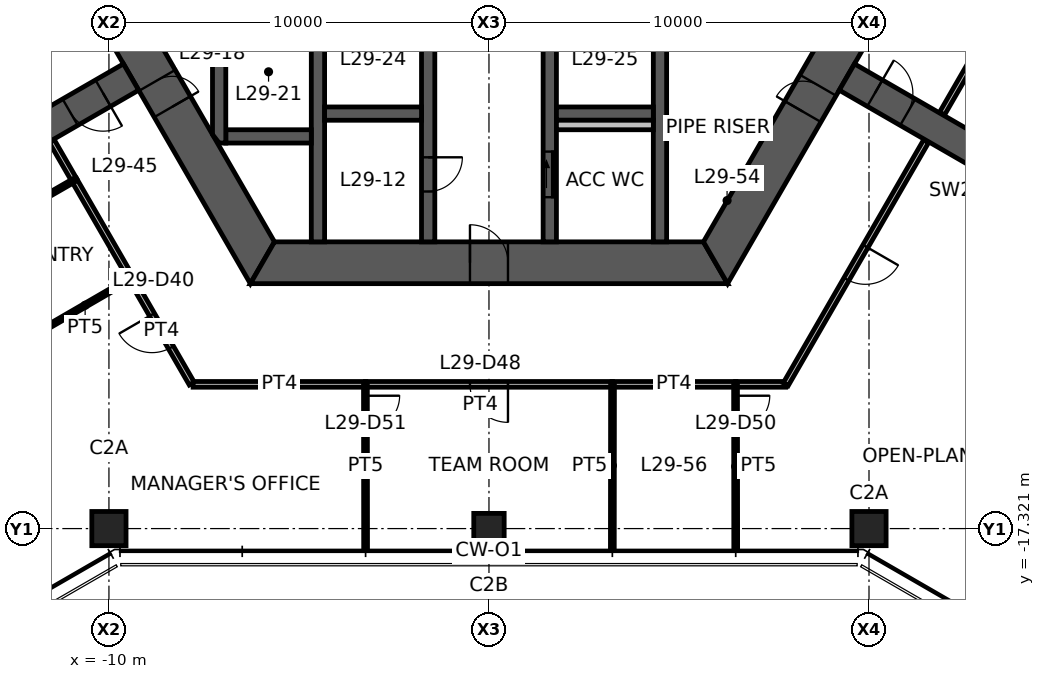
"""IFC4 building model, lengths in metres.
Left out: names, types, materials, properties, quantities, classifications, styles, units other than length and angle.
Written with IfcOpenShell. Run it as: python <this file> out.ifc"""

import sys

from ifc_helpers import new_model, si_unit, direction, frame, frame_2d, origin, origin_2d, place, context, subcontext, project, spatial, polyline, rectangle, hollow_rectangle, outline, extrude, element, fill, save


model = new_model("IFC4")
c1 = context("Model", 3, precision=1e-05, world=origin(), true_north=direction((0.0, 1.0)))
c2 = subcontext(c1, "Body", "Model", "MODEL_VIEW")
j1 = project(units=[si_unit("LENGTHUNIT", "METRE"), si_unit("PLANEANGLEUNIT", "RADIAN")], contexts=[c1])
p1 = place(None, origin())
s1 = spatial("IfcSite", under=j1, at=p1, CompositionType="ELEMENT")
p2 = place(p1, origin())
s2 = spatial("IfcBuilding", under=s1, at=p2, CompositionType="ELEMENT")
p3 = place(p2, frame((0.0, 0.0, 115.8)))
s3 = spatial("IfcBuildingStorey", under=s2, at=p3, CompositionType="ELEMENT", Elevation=115.8)
for number, where, z_axis, x_axis in (
    (1, (-10.0, -17.321, 0.0), (0.0, 0.0, 1.0), (1.0, 0.0, 0.0)),
    (2, (10.0, -17.321, 0.0), (0.0, 0.0, 1.0), (1.0, 0.0, 0.0)),
):
    element("IfcColumn", number, at=place(p3, frame(where, z_axis=z_axis, x_axis=x_axis)), inside=s3, PredefinedType="COLUMN", context=c2, shape_type="SweptSolid", body=[
        extrude(hollow_rectangle(XDim=0.9, YDim=0.9, WallThickness=0.055, at=origin_2d()), origin(), (0.0, 0.0, 1.0), 3.9),
    ])
p4 = place(p3, frame((0.0, -17.321, 0.0), z_axis=(0.0, 0.0, 1.0), x_axis=(1.0, 0.0, 0.0)))
e3 = element("IfcColumn", 3, at=p4, inside=s3, PredefinedType="COLUMN", context=c2, shape_type="SweptSolid", body=[
    extrude(hollow_rectangle(XDim=0.8, YDim=0.8, WallThickness=0.045, at=origin_2d()), origin(), (0.0, 0.0, 1.0), 3.9),
])
p5 = place(p3, frame((-11.922, 0.0, 0.0), z_axis=(0.0, 0.0, 1.0), x_axis=(0.500004296715, -0.866022923061, 0.0)))
e4 = element("IfcWall", 4, at=p5, inside=s3, PredefinedType="SHEAR", context=c2, shape_type="SweptSolid", body=[
    extrude(outline(polyline([(-0.318, -0.55), (6.381, -0.55), (7.181, -0.55), (12.24, -0.55), (11.605, 0.55), (7.181, 0.55), (6.381, 0.55), (0.318, 0.55), (-0.318, -0.55)])), origin(), (0.0, 0.0, 1.0), 3.9),
])
p6 = place(p5, frame((6.381, 0.0, 0.0)))
e5 = element("IfcOpeningElement", 5, at=p6, cuts=e4, PredefinedType="OPENING", context=c2, shape_type="SweptSolid", body=[
    extrude(rectangle(XDim=0.8, YDim=2.1, at=frame_2d((0.4, 1.05))), frame((0.0, 0.56, 0.0), z_axis=(0.0, -1.0, 0.0), x_axis=(1.0, 0.0, 0.0)), (0.0, 0.0, 1.0), 1.12),
])
p7 = place(p3, frame((-5.961, -10.325, 0.0), z_axis=(0.0, 0.0, 1.0), x_axis=(1.0, 0.0, 0.0)))
e6 = element("IfcWall", 6, at=p7, inside=s3, PredefinedType="SHEAR", context=c2, shape_type="SweptSolid", body=[
    extrude(outline(polyline([(-0.318, -0.55), (5.461, -0.55), (6.461, -0.55), (12.24, -0.55), (11.605, 0.55), (6.461, 0.55), (5.461, 0.55), (0.318, 0.55), (-0.318, -0.55)])), origin(), (0.0, 0.0, 1.0), 3.9),
])
p8 = place(p7, frame((5.461, 0.0, 0.0)))
e7 = element("IfcOpeningElement", 7, at=p8, cuts=e6, PredefinedType="OPENING", context=c2, shape_type="SweptSolid", body=[
    extrude(rectangle(XDim=1.0, YDim=2.1, at=frame_2d((0.5, 1.05))), frame((0.0, 0.56, 0.0), z_axis=(0.0, -1.0, 0.0), x_axis=(1.0, 0.0, 0.0)), (0.0, 0.0, 1.0), 1.12),
])
p9 = place(p3, frame((5.961, -10.325, 0.0), z_axis=(0.0, 0.0, 1.0), x_axis=(0.500004296715, 0.866022923061, 0.0)))
e8 = element("IfcWall", 8, at=p9, inside=s3, PredefinedType="SHEAR", context=c2, shape_type="SweptSolid", body=[
    extrude(outline(polyline([(-0.318, -0.55), (4.594, -0.55), (5.394, -0.55), (12.24, -0.55), (11.605, 0.55), (5.394, 0.55), (4.594, 0.55), (0.318, 0.55), (-0.318, -0.55)])), origin(), (0.0, 0.0, 1.0), 3.9),
])
p10 = place(p9, frame((4.594, 0.0, 0.0)))
e9 = element("IfcOpeningElement", 9, at=p10, cuts=e8, PredefinedType="OPENING", context=c2, shape_type="SweptSolid", body=[
    extrude(rectangle(XDim=0.8, YDim=2.1, at=frame_2d((0.4, 1.05))), frame((0.0, 0.56, 0.0), z_axis=(0.0, -1.0, 0.0), x_axis=(1.0, 0.0, 0.0)), (0.0, 0.0, 1.0), 1.12),
])
p11 = place(p3, frame((-9.418, -5.438, 0.0), z_axis=(0.0, 0.0, 1.0), x_axis=(-0.866029782078, -0.499992416496, 0.0)))
e10 = element("IfcWall", 10, at=p11, inside=s3, PredefinedType="SHEAR", context=c2, shape_type="SweptSolid", body=[
    extrude(rectangle(XDim=7.646, YDim=0.8, at=frame_2d((3.823, 0.0))), origin(), (0.0, 0.0, 1.0), 3.9),
])
p12 = place(p11, frame((0.85, 0.0, 0.0)))
e11 = element("IfcOpeningElement", 11, at=p12, cuts=e10, PredefinedType="OPENING", context=c2, shape_type="SweptSolid", body=[
    extrude(rectangle(XDim=1.0, YDim=2.1, at=frame_2d((0.5, 1.05))), frame((0.0, 0.41, 0.0), z_axis=(0.0, -1.0, 0.0), x_axis=(1.0, 0.0, 0.0)), (0.0, 0.0, 1.0), 0.82),
])
p13 = place(p3, frame((9.418, -5.438, 0.0), z_axis=(0.0, 0.0, 1.0), x_axis=(0.866029782078, -0.499992416496, 0.0)))
e12 = element("IfcWall", 12, at=p13, inside=s3, PredefinedType="SHEAR", context=c2, shape_type="SweptSolid", body=[
    extrude(rectangle(XDim=7.646, YDim=0.8, at=frame_2d((3.823, 0.0))), origin(), (0.0, 0.0, 1.0), 3.9),
])
p14 = place(p13, frame((0.85, 0.0, 0.0)))
e13 = element("IfcOpeningElement", 13, at=p14, cuts=e12, PredefinedType="OPENING", context=c2, shape_type="SweptSolid", body=[
    extrude(rectangle(XDim=1.0, YDim=2.1, at=frame_2d((0.5, 1.05))), frame((0.0, 0.41, 0.0), z_axis=(0.0, -1.0, 0.0), x_axis=(1.0, 0.0, 0.0)), (0.0, 0.0, 1.0), 0.82),
])
p15 = place(p3, frame((-1.6, -3.775, 0.0), z_axis=(0.0, 0.0, 1.0), x_axis=(0.0, -1.0, 0.0)))
e14 = element("IfcWall", 14, at=p15, inside=s3, PredefinedType="SHEAR", context=c2, shape_type="SweptSolid", body=[
    extrude(rectangle(XDim=6.0, YDim=0.35, at=frame_2d((3.0, 0.0))), origin(), (0.0, 0.0, 1.0), 3.9),
])
p16 = place(p15, frame((3.775, 0.0, 0.0)))
e15 = element("IfcOpeningElement", 15, at=p16, cuts=e14, PredefinedType="OPENING", context=c2, shape_type="SweptSolid", body=[
    extrude(rectangle(XDim=0.9, YDim=2.1, at=frame_2d((0.45, 1.05))), frame((0.0, 0.185, 0.0), z_axis=(0.0, -1.0, 0.0), x_axis=(1.0, 0.0, 0.0)), (0.0, 0.0, 1.0), 0.37),
])
p17 = place(p3, frame((1.6, -3.775, 0.0), z_axis=(0.0, 0.0, 1.0), x_axis=(0.0, -1.0, 0.0)))
e16 = element("IfcWall", 16, at=p17, inside=s3, PredefinedType="SHEAR", context=c2, shape_type="SweptSolid", body=[
    extrude(rectangle(XDim=6.0, YDim=0.35, at=frame_2d((3.0, 0.0))), origin(), (0.0, 0.0, 1.0), 3.9),
])
p18 = place(p17, frame((3.625, 0.0, 0.0)))
e17 = element("IfcOpeningElement", 17, at=p18, cuts=e16, PredefinedType="OPENING", context=c2, shape_type="SweptSolid", body=[
    extrude(rectangle(XDim=1.2, YDim=2.1, at=frame_2d((0.6, 1.05))), frame((0.0, 0.185, 0.0), z_axis=(0.0, -1.0, 0.0), x_axis=(1.0, 0.0, 0.0)), (0.0, 0.0, 1.0), 0.37),
])
for number, where, z_axis, x_axis in (
    (18, (-4.5, -3.775, 0.0), (0.0, 0.0, 1.0), (0.0, -1.0, 0.0)),
    (19, (4.5, -3.775, 0.0), (0.0, 0.0, 1.0), (0.0, -1.0, 0.0)),
):
    element("IfcWall", number, at=place(p3, frame(where, z_axis=z_axis, x_axis=x_axis)), inside=s3, PredefinedType="SHEAR", context=c2, shape_type="SweptSolid", body=[
        extrude(rectangle(XDim=6.0, YDim=0.35, at=frame_2d((3.0, 0.0))), origin(), (0.0, 0.0, 1.0), 3.9),
    ])
for number, where, z_axis, x_axis in (
    (20, (-4.325, -6.4, 0.0), (0.0, 0.0, 1.0), (1.0, 0.0, 0.0)),
    (21, (1.775, -6.4, 0.0), (0.0, 0.0, 1.0), (1.0, 0.0, 0.0)),
):
    element("IfcWall", number, at=place(p3, frame(where, z_axis=z_axis, x_axis=x_axis)), inside=s3, PredefinedType="SHEAR", context=c2, shape_type="SweptSolid", body=[
        extrude(rectangle(XDim=2.55, YDim=0.35, at=frame_2d((1.275, 0.0))), origin(), (0.0, 0.0, 1.0), 3.9),
    ])
p19 = place(p3, frame((-6.925, -7.0, 0.0), z_axis=(0.0, 0.0, 1.0), x_axis=(1.0, 0.0, 0.0)))
e22 = element("IfcWall", 22, at=p19, inside=s3, PredefinedType="SHEAR", context=c2, shape_type="SweptSolid", body=[
    extrude(rectangle(XDim=2.25, YDim=0.35, at=frame_2d((1.125, 0.0))), origin(), (0.0, 0.0, 1.0), 3.9),
])
p20 = place(p3, frame((-7.1, -3.775, 0.0), z_axis=(0.0, 0.0, 1.0), x_axis=(0.0, -1.0, 0.0)))
e23 = element("IfcWall", 23, at=p20, inside=s3, PredefinedType="SHEAR", context=c2, shape_type="SweptSolid", body=[
    extrude(outline(polyline([(0.0, -0.175), (3.175, -0.175), (3.4, 0.0), (3.4, 0.175), (0.0, 0.175), (0.0, -0.175)])), origin(), (0.0, 0.0, 1.0), 3.9),
])
p21 = place(p3, frame((1.775, -6.7, 0.0), z_axis=(0.0, 0.0, 1.0), x_axis=(1.0, 0.0, 0.0)))
e24 = element("IfcWall", 24, at=p21, inside=s3, PredefinedType="PLUMBINGWALL", context=c2, shape_type="SweptSolid", body=[
    extrude(rectangle(XDim=2.55, YDim=0.25, at=frame_2d((1.275, 0.0))), origin(), (0.0, 0.0, 1.0), 3.9),
])
p22 = place(p3, frame((-9.41, -10.75, 0.0), z_axis=(0.0, 0.0, 1.0), x_axis=(-0.500038395149, 0.8660032352, 0.0)))
e25 = element("IfcWall", 25, at=p22, inside=s3, PredefinedType="PARTITIONING", context=c2, shape_type="SweptSolid", body=[
    extrude(rectangle(XDim=3.01, YDim=0.15, at=frame_2d((1.505, 0.0))), origin(), (0.0, 0.0, 1.0), 2.95),
])
p23 = place(p3, frame((-10.911, -8.152, 0.0), z_axis=(0.0, 0.0, 1.0), x_axis=(-0.499841408252, 0.866116947413, 0.0)))
e26 = element("IfcWall", 26, at=p23, inside=s3, PredefinedType="PARTITIONING", context=c2, shape_type="SweptSolid", body=[
    extrude(rectangle(XDim=1.185, YDim=0.15, at=frame_2d((0.592, 0.0))), origin(), (0.0, 0.0, 1.0), 2.95),
])
p24 = place(p3, frame((-7.82, -13.505, 0.0), z_axis=(0.0, 0.0, 1.0), x_axis=(-0.499983030129, 0.866035201123, 0.0)))
e27 = element("IfcWall", 27, at=p24, inside=s3, PredefinedType="PARTITIONING", context=c2, shape_type="SweptSolid", body=[
    extrude(rectangle(XDim=3.19, YDim=0.15, at=frame_2d((1.595, 0.0))), origin(), (0.0, 0.0, 1.0), 2.95),
])
p25 = place(p24, frame((1.095, 0.0, 0.0)))
e28 = element("IfcOpeningElement", 28, at=p25, cuts=e27, PredefinedType="OPENING", context=c2, shape_type="SweptSolid", body=[
    extrude(rectangle(XDim=1.0, YDim=2.1, at=frame_2d((0.5, 1.05))), frame((0.0, 0.085, 0.0), z_axis=(0.0, -1.0, 0.0), x_axis=(1.0, 0.0, 0.0)), (0.0, 0.0, 1.0), 0.17),
])
p26 = place(p3, frame((-13.338, -9.548, 0.0), z_axis=(0.0, 0.0, 1.0), x_axis=(0.866833758708, 0.498597267105, 0.0)))
e29 = element("IfcWall", 29, at=p26, inside=s3, PredefinedType="PARTITIONING", context=c2, shape_type="SweptSolid", body=[
    extrude(rectangle(XDim=2.8, YDim=0.1, at=frame_2d((1.4, 0.0))), origin(), (0.0, 0.0, 1.0), 2.95),
])
p27 = place(p3, frame((-9.415, -10.742, 0.0), z_axis=(0.0, 0.0, 1.0), x_axis=(-0.865195372903, -0.501434907746, 0.0)))
e30 = element("IfcWall", 30, at=p27, inside=s3, PredefinedType="PARTITIONING", context=c2, shape_type="SweptSolid", body=[
    extrude(rectangle(XDim=2.8, YDim=0.1, at=frame_2d((1.4, 0.0))), origin(), (0.0, 0.0, 1.0), 2.95),
])
p28 = place(p3, frame((15.606, -0.02, 0.0), z_axis=(0.0, 0.0, 1.0), x_axis=(-0.499989298045, -0.866031582473, 0.0)))
e31 = element("IfcWall", 31, at=p28, inside=s3, PredefinedType="PARTITIONING", context=c2, shape_type="SweptSolid", body=[
    extrude(rectangle(XDim=7.365, YDim=0.15, at=frame_2d((3.683, 0.0))), origin(), (0.0, 0.0, 1.0), 2.95),
])
p29 = place(p28, frame((3.183, 0.0, 0.0)))
e32 = element("IfcOpeningElement", 32, at=p29, cuts=e31, PredefinedType="OPENING", context=c2, shape_type="SweptSolid", body=[
    extrude(rectangle(XDim=1.0, YDim=2.1, at=frame_2d((0.5, 1.05))), frame((0.0, 0.085, 0.0), z_axis=(0.0, -1.0, 0.0), x_axis=(1.0, 0.0, 0.0)), (0.0, 0.0, 1.0), 0.17),
])
p30 = place(p3, frame((6.498, -13.525, 0.0), z_axis=(0.0, 0.0, 1.0), x_axis=(-1.0, 0.0, 0.0)))
e33 = element("IfcWall", 33, at=p30, inside=s3, PredefinedType="PARTITIONING", context=c2, shape_type="SweptSolid", body=[
    extrude(rectangle(XDim=3.256, YDim=0.15, at=frame_2d((1.628, 0.0))), origin(), (0.0, 0.0, 1.0), 2.95),
])
p31 = place(p3, frame((-3.241, -13.525, 0.0), z_axis=(0.0, 0.0, 1.0), x_axis=(-1.0, 0.0, 0.0)))
e34 = element("IfcWall", 34, at=p31, inside=s3, PredefinedType="PARTITIONING", context=c2, shape_type="SweptSolid", body=[
    extrude(rectangle(XDim=4.544, YDim=0.15, at=frame_2d((2.272, 0.0))), origin(), (0.0, 0.0, 1.0), 2.95),
])
p32 = place(p3, frame((7.809, -13.525, 0.0), z_axis=(0.0, 0.0, 1.0), x_axis=(-1.0, 0.0, 0.0)))
e35 = element("IfcWall", 35, at=p32, inside=s3, PredefinedType="PARTITIONING", context=c2, shape_type="SweptSolid", body=[
    extrude(rectangle(XDim=1.32, YDim=0.15, at=frame_2d((0.66, 0.0))), origin(), (0.0, 0.0, 1.0), 2.95),
])
p33 = place(p3, frame((11.503, -7.126, 0.0), z_axis=(0.0, 0.0, 1.0), x_axis=(-0.500005620463, -0.866022158784, 0.0)))
e36 = element("IfcWall", 36, at=p33, inside=s3, PredefinedType="PARTITIONING", context=c2, shape_type="SweptSolid", body=[
    extrude(rectangle(XDim=7.389, YDim=0.15, at=frame_2d((3.694, 0.0))), origin(), (0.0, 0.0, 1.0), 2.95),
])
p34 = place(p33, frame((3.194, 0.0, 0.0)))
e37 = element("IfcOpeningElement", 37, at=p34, cuts=e36, PredefinedType="OPENING", context=c2, shape_type="SweptSolid", body=[
    extrude(rectangle(XDim=1.0, YDim=2.1, at=frame_2d((0.5, 1.05))), frame((0.0, 0.085, 0.0), z_axis=(0.0, -1.0, 0.0), x_axis=(1.0, 0.0, 0.0)), (0.0, 0.0, 1.0), 0.17),
])
p35 = place(p3, frame((3.251, -13.525, 0.0), z_axis=(0.0, 0.0, 1.0), x_axis=(-1.0, 0.0, 0.0)))
e38 = element("IfcWall", 38, at=p35, inside=s3, PredefinedType="PARTITIONING", context=c2, shape_type="SweptSolid", body=[
    extrude(rectangle(XDim=6.502, YDim=0.15, at=frame_2d((3.251, 0.0))), origin(), (0.0, 0.0, 1.0), 2.95),
])
p36 = place(p35, frame((2.751, 0.0, 0.0)))
e39 = element("IfcOpeningElement", 39, at=p36, cuts=e38, PredefinedType="OPENING", context=c2, shape_type="SweptSolid", body=[
    extrude(rectangle(XDim=1.0, YDim=2.1, at=frame_2d((0.5, 1.05))), frame((0.0, 0.085, 0.0), z_axis=(0.0, -1.0, 0.0), x_axis=(1.0, 0.0, 0.0)), (0.0, 0.0, 1.0), 0.17),
])
p37 = place(p3, frame((6.488, -13.525, 0.0), z_axis=(0.0, 0.0, 1.0), x_axis=(0.00107362768, -0.999999423662, 0.0)))
e40 = element("IfcWall", 40, at=p37, inside=s3, PredefinedType="PARTITIONING", context=c2, shape_type="SweptSolid", body=[
    extrude(rectangle(XDim=4.321, YDim=0.1, at=frame_2d((2.16, 0.0))), origin(), (0.0, 0.0, 1.0), 2.95),
])
p38 = place(p37, frame((0.3, 0.0, 0.0)))
e41 = element("IfcOpeningElement", 41, at=p38, cuts=e40, PredefinedType="OPENING", context=c2, shape_type="SweptSolid", body=[
    extrude(rectangle(XDim=0.9, YDim=2.1, at=frame_2d((0.45, 1.05))), frame((0.0, 0.06, 0.0), z_axis=(0.0, -1.0, 0.0), x_axis=(1.0, 0.0, 0.0)), (0.0, 0.0, 1.0), 0.12),
])
p39 = place(p3, frame((3.246, -17.801, 0.0), z_axis=(0.0, 0.0, 1.0), x_axis=(0.001084907715, 0.999999411487, 0.0)))
e42 = element("IfcWall", 42, at=p39, inside=s3, PredefinedType="PARTITIONING", context=c2, shape_type="SweptSolid", body=[
    extrude(rectangle(XDim=4.276, YDim=0.1, at=frame_2d((2.138, 0.0))), origin(), (0.0, 0.0, 1.0), 2.95),
])
p40 = place(p3, frame((-3.251, -13.525, 0.0), z_axis=(0.0, 0.0, 1.0), x_axis=(0.00107362768, -0.999999423662, 0.0)))
e43 = element("IfcWall", 43, at=p40, inside=s3, PredefinedType="PARTITIONING", context=c2, shape_type="SweptSolid", body=[
    extrude(rectangle(XDim=4.321, YDim=0.1, at=frame_2d((2.16, 0.0))), origin(), (0.0, 0.0, 1.0), 2.95),
])
p41 = place(p40, frame((0.3, 0.0, 0.0)))
e44 = element("IfcOpeningElement", 44, at=p41, cuts=e43, PredefinedType="OPENING", context=c2, shape_type="SweptSolid", body=[
    extrude(rectangle(XDim=0.9, YDim=2.1, at=frame_2d((0.45, 1.05))), frame((0.0, 0.06, 0.0), z_axis=(0.0, -1.0, 0.0), x_axis=(1.0, 0.0, 0.0)), (0.0, 0.0, 1.0), 0.12),
])
p42 = place(p8, origin())
e45 = element("IfcDoor", 45, at=p42, inside=s3, OperationType="SINGLE_SWING_LEFT", PredefinedType="DOOR", context=c2, shape_type="SweptSolid", body=[
    extrude(rectangle(XDim=1.0, YDim=2.1, at=frame_2d((0.5, 1.05))), frame((0.0, 0.025, 0.0), z_axis=(0.0, -1.0, 0.0), x_axis=(1.0, 0.0, 0.0)), (0.0, 0.0, 1.0), 0.05),
])
fill(e7, e45)
p43 = place(p10, origin())
e46 = element("IfcDoor", 46, at=p43, inside=s3, OperationType="SINGLE_SWING_LEFT", PredefinedType="DOOR", context=c2, shape_type="SweptSolid", body=[
    extrude(rectangle(XDim=0.8, YDim=2.1, at=frame_2d((0.4, 1.05))), frame((0.0, 0.025, 0.0), z_axis=(0.0, -1.0, 0.0), x_axis=(1.0, 0.0, 0.0)), (0.0, 0.0, 1.0), 0.05),
])
fill(e9, e46)
p44 = place(p6, origin())
e47 = element("IfcDoor", 47, at=p44, inside=s3, OperationType="SINGLE_SWING_RIGHT", PredefinedType="DOOR", context=c2, shape_type="SweptSolid", body=[
    extrude(rectangle(XDim=0.8, YDim=2.1, at=frame_2d((0.4, 1.05))), frame((0.0, 0.025, 0.0), z_axis=(0.0, -1.0, 0.0), x_axis=(1.0, 0.0, 0.0)), (0.0, 0.0, 1.0), 0.05),
])
fill(e5, e47)
p45 = place(p18, origin())
e48 = element("IfcDoor", 48, at=p45, inside=s3, OperationType="SLIDING_TO_LEFT", PredefinedType="DOOR", context=c2, shape_type="SweptSolid", body=[
    extrude(rectangle(XDim=1.2, YDim=2.1, at=frame_2d((0.6, 1.05))), frame((0.0, 0.025, 0.0), z_axis=(0.0, -1.0, 0.0), x_axis=(1.0, 0.0, 0.0)), (0.0, 0.0, 1.0), 0.05),
])
fill(e17, e48)
p46 = place(p16, origin())
e49 = element("IfcDoor", 49, at=p46, inside=s3, OperationType="SINGLE_SWING_LEFT", PredefinedType="DOOR", context=c2, shape_type="SweptSolid", body=[
    extrude(rectangle(XDim=0.9, YDim=2.1, at=frame_2d((0.45, 1.05))), frame((0.0, 0.025, 0.0), z_axis=(0.0, -1.0, 0.0), x_axis=(1.0, 0.0, 0.0)), (0.0, 0.0, 1.0), 0.05),
])
fill(e15, e49)
p47 = place(p12, origin())
e50 = element("IfcDoor", 50, at=p47, inside=s3, OperationType="SINGLE_SWING_LEFT", PredefinedType="DOOR", context=c2, shape_type="SweptSolid", body=[
    extrude(rectangle(XDim=1.0, YDim=2.1, at=frame_2d((0.5, 1.05))), frame((0.0, 0.025, 0.0), z_axis=(0.0, -1.0, 0.0), x_axis=(1.0, 0.0, 0.0)), (0.0, 0.0, 1.0), 0.05),
])
fill(e11, e50)
p48 = place(p14, origin())
e51 = element("IfcDoor", 51, at=p48, inside=s3, OperationType="SINGLE_SWING_LEFT", PredefinedType="DOOR", context=c2, shape_type="SweptSolid", body=[
    extrude(rectangle(XDim=1.0, YDim=2.1, at=frame_2d((0.5, 1.05))), frame((0.0, 0.025, 0.0), z_axis=(0.0, -1.0, 0.0), x_axis=(1.0, 0.0, 0.0)), (0.0, 0.0, 1.0), 0.05),
])
fill(e13, e51)
p49 = place(p25, origin())
e52 = element("IfcDoor", 52, at=p49, inside=s3, OperationType="SINGLE_SWING_RIGHT", PredefinedType="DOOR", context=c2, shape_type="SweptSolid", body=[
    extrude(rectangle(XDim=1.0, YDim=2.1, at=frame_2d((0.5, 1.05))), frame((0.0, 0.025, 0.0), z_axis=(0.0, -1.0, 0.0), x_axis=(1.0, 0.0, 0.0)), (0.0, 0.0, 1.0), 0.05),
])
fill(e28, e52)
p50 = place(p34, origin())
e53 = element("IfcDoor", 53, at=p50, inside=s3, OperationType="SINGLE_SWING_LEFT", PredefinedType="DOOR", context=c2, shape_type="SweptSolid", body=[
    extrude(rectangle(XDim=1.0, YDim=2.1, at=frame_2d((0.5, 1.05))), frame((0.0, 0.025, 0.0), z_axis=(0.0, -1.0, 0.0), x_axis=(1.0, 0.0, 0.0)), (0.0, 0.0, 1.0), 0.05),
])
fill(e37, e53)
p51 = place(p36, origin())
e54 = element("IfcDoor", 54, at=p51, inside=s3, OperationType="SINGLE_SWING_LEFT", PredefinedType="DOOR", context=c2, shape_type="SweptSolid", body=[
    extrude(rectangle(XDim=1.0, YDim=2.1, at=frame_2d((0.5, 1.05))), frame((0.0, 0.025, 0.0), z_axis=(0.0, -1.0, 0.0), x_axis=(1.0, 0.0, 0.0)), (0.0, 0.0, 1.0), 0.05),
])
fill(e39, e54)
p52 = place(p38, origin())
e55 = element("IfcDoor", 55, at=p52, inside=s3, OperationType="SINGLE_SWING_LEFT", PredefinedType="DOOR", context=c2, shape_type="SweptSolid", body=[
    extrude(rectangle(XDim=0.9, YDim=2.1, at=frame_2d((0.45, 1.05))), frame((0.0, 0.025, 0.0), z_axis=(0.0, -1.0, 0.0), x_axis=(1.0, 0.0, 0.0)), (0.0, 0.0, 1.0), 0.05),
])
fill(e41, e55)
p53 = place(p41, origin())
e56 = element("IfcDoor", 56, at=p53, inside=s3, OperationType="SINGLE_SWING_LEFT", PredefinedType="DOOR", context=c2, shape_type="SweptSolid", body=[
    extrude(rectangle(XDim=0.9, YDim=2.1, at=frame_2d((0.45, 1.05))), frame((0.0, 0.025, 0.0), z_axis=(0.0, -1.0, 0.0), x_axis=(1.0, 0.0, 0.0)), (0.0, 0.0, 1.0), 0.05),
])
fill(e44, e56)
save(model, sys.argv[1])
